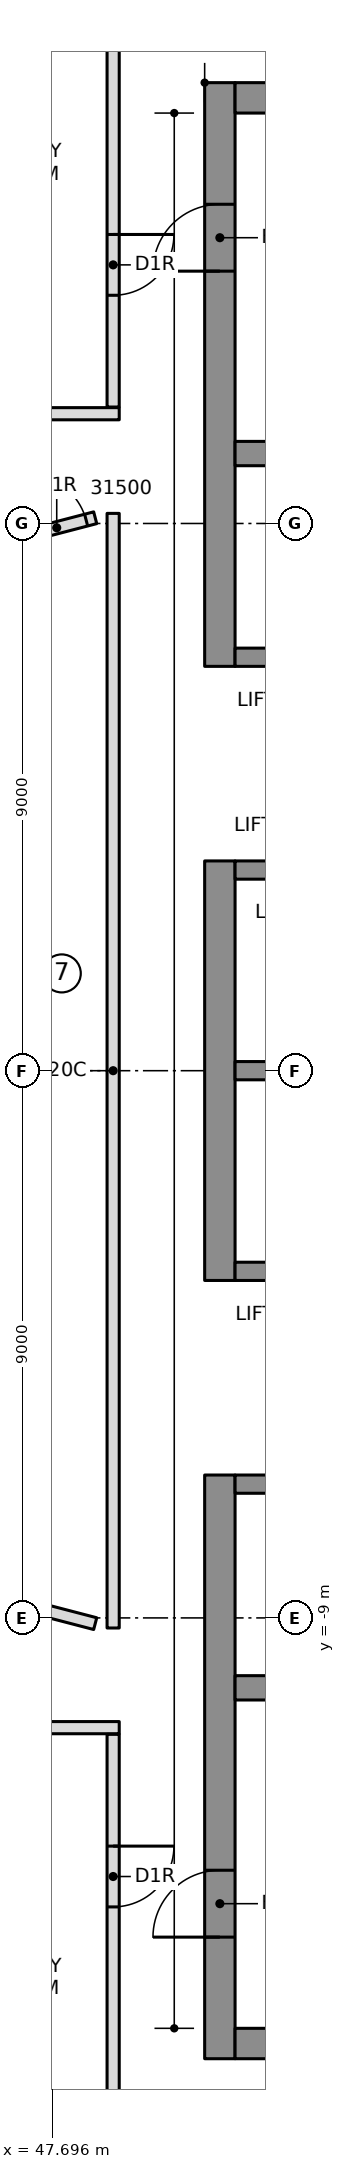
"""IFC4 building model, lengths in metres.
Left out: names, types, materials, properties, quantities, classifications, styles, units other than length and angle.
Written with IfcOpenShell. Run it as: python <this file> out.ifc"""

import sys

from ifc_helpers import new_model, si_unit, direction, frame, frame_2d, origin, place, context, subcontext, project, spatial, rectangle, extrude, element, fill, save


model = new_model("IFC4")
c1 = context("Model", 3, precision=1e-05, world=origin(), true_north=direction((0.0, 1.0)))
c2 = subcontext(c1, "Body", "Model", "MODEL_VIEW")
j1 = project(units=[si_unit("LENGTHUNIT", "METRE"), si_unit("PLANEANGLEUNIT", "RADIAN")], contexts=[c1])
p1 = place(None, origin())
s1 = spatial("IfcSite", under=j1, at=p1, CompositionType="ELEMENT")
p2 = place(p1, origin())
s2 = spatial("IfcBuilding", under=s1, at=p2, CompositionType="ELEMENT")
p3 = place(p2, frame((0.0, 0.0, 308.6)))
s3 = spatial("IfcBuildingStorey", under=s2, at=p3, CompositionType="ELEMENT", Elevation=308.6)
p4 = place(p3, frame((50.45, 6.65, 0.0), z_axis=(0.0, 0.0, 1.0), x_axis=(0.0, 1.0, 0.0)))
e1 = element("IfcWall", 1, at=p4, inside=s3, PredefinedType="SHEAR", context=c2, shape_type="SweptSolid", body=[
    extrude(rectangle(XDim=9.6, YDim=0.5, at=frame_2d((4.8, 0.0))), origin(), (0.0, 0.0, 1.0), 4.6),
])
p5 = place(p4, frame((6.5, 0.0, 0.0)))
e2 = element("IfcOpeningElement", 2, at=p5, cuts=e1, PredefinedType="OPENING", context=c2, shape_type="SweptSolid", body=[
    extrude(rectangle(XDim=1.1, YDim=2.1, at=frame_2d((0.55, 1.05))), frame((0.0, 0.26, 0.0), z_axis=(0.0, -1.0, 0.0), x_axis=(1.0, 0.0, 0.0)), (0.0, 0.0, 1.0), 0.52),
])
p6 = place(p3, frame((50.45, -3.45, 0.0), z_axis=(0.0, 0.0, 1.0), x_axis=(0.0, 1.0, 0.0)))
e3 = element("IfcWall", 3, at=p6, inside=s3, PredefinedType="SHEAR", context=c2, shape_type="SweptSolid", body=[
    extrude(rectangle(XDim=6.9, YDim=0.5, at=frame_2d((3.45, 0.0))), origin(), (0.0, 0.0, 1.0), 4.6),
])
p7 = place(p3, frame((50.45, -16.25, 0.0), z_axis=(0.0, 0.0, 1.0), x_axis=(0.0, 1.0, 0.0)))
e4 = element("IfcWall", 4, at=p7, inside=s3, PredefinedType="SHEAR", context=c2, shape_type="SweptSolid", body=[
    extrude(rectangle(XDim=9.6, YDim=0.5, at=frame_2d((4.8, 0.0))), origin(), (0.0, 0.0, 1.0), 4.6),
])
p8 = place(p7, frame((2.0, 0.0, 0.0)))
e5 = element("IfcOpeningElement", 5, at=p8, cuts=e4, PredefinedType="OPENING", context=c2, shape_type="SweptSolid", body=[
    extrude(rectangle(XDim=1.1, YDim=2.1, at=frame_2d((0.55, 1.05))), frame((0.0, 0.26, 0.0), z_axis=(0.0, -1.0, 0.0), x_axis=(1.0, 0.0, 0.0)), (0.0, 0.0, 1.0), 0.52),
])
for number, where, z_axis, x_axis in (
    (6, (50.7, 16.0, 0.0), (0.0, 0.0, 1.0), (1.0, 0.0, 0.0)),
    (7, (50.7, -16.0, 0.0), (0.0, 0.0, 1.0), (1.0, 0.0, 0.0)),
):
    element("IfcWall", number, at=place(p3, frame(where, z_axis=z_axis, x_axis=x_axis)), inside=s3, PredefinedType="SHEAR", context=c2, shape_type="SweptSolid", body=[
        extrude(rectangle(XDim=13.52, YDim=0.5, at=frame_2d((6.76, 0.0))), origin(), (0.0, 0.0, 1.0), 4.6),
    ])
p9 = place(p3, frame((50.7, 10.15, 0.0), z_axis=(0.0, 0.0, 1.0), x_axis=(1.0, 0.0, 0.0)))
e8 = element("IfcWall", 8, at=p9, inside=s3, PredefinedType="SHEAR", context=c2, shape_type="SweptSolid", body=[
    extrude(rectangle(XDim=13.02, YDim=0.4, at=frame_2d((6.51, 0.0))), origin(), (0.0, 0.0, 1.0), 4.6),
])
p10 = place(p9, frame((0.7, 0.0, 0.0)))
e9 = element("IfcOpeningElement", 9, at=p10, cuts=e8, PredefinedType="OPENING", context=c2, shape_type="SweptSolid", body=[
    extrude(rectangle(XDim=1.1, YDim=2.1, at=frame_2d((0.55, 1.05))), frame((0.0, 0.21, 0.0), z_axis=(0.0, -1.0, 0.0), x_axis=(1.0, 0.0, 0.0)), (0.0, 0.0, 1.0), 0.42),
])
p11 = place(p9, frame((3.5, 0.0, 0.0)))
e10 = element("IfcOpeningElement", 10, at=p11, cuts=e8, PredefinedType="OPENING", context=c2, shape_type="SweptSolid", body=[
    extrude(rectangle(XDim=1.1, YDim=2.1, at=frame_2d((0.55, 1.05))), frame((0.0, 0.21, 0.0), z_axis=(0.0, -1.0, 0.0), x_axis=(1.0, 0.0, 0.0)), (0.0, 0.0, 1.0), 0.42),
])
p12 = place(p3, frame((50.7, -10.15, 0.0), z_axis=(0.0, 0.0, 1.0), x_axis=(1.0, 0.0, 0.0)))
e11 = element("IfcWall", 11, at=p12, inside=s3, PredefinedType="SHEAR", context=c2, shape_type="SweptSolid", body=[
    extrude(rectangle(XDim=13.02, YDim=0.4, at=frame_2d((6.51, 0.0))), origin(), (0.0, 0.0, 1.0), 4.6),
])
p13 = place(p3, frame((50.7, 0.0, 0.0), z_axis=(0.0, 0.0, 1.0), x_axis=(1.0, 0.0, 0.0)))
e12 = element("IfcWall", 12, at=p13, inside=s3, PredefinedType="SHEAR", context=c2, shape_type="SweptSolid", body=[
    extrude(rectangle(XDim=10.9, YDim=0.3, at=frame_2d((5.45, 0.0))), origin(), (0.0, 0.0, 1.0), 4.6),
])
p14 = place(p3, frame((50.7, 3.3, 0.0), z_axis=(0.0, 0.0, 1.0), x_axis=(1.0, 0.0, 0.0)))
e13 = element("IfcWall", 13, at=p14, inside=s3, PredefinedType="SHEAR", context=c2, shape_type="SweptSolid", body=[
    extrude(rectangle(XDim=10.9, YDim=0.3, at=frame_2d((5.45, 0.0))), origin(), (0.0, 0.0, 1.0), 4.6),
])
p15 = place(p14, frame((0.7, 0.0, 0.0)))
e14 = element("IfcOpeningElement", 14, at=p15, cuts=e13, PredefinedType="OPENING", context=c2, shape_type="SweptSolid", body=[
    extrude(rectangle(XDim=1.1, YDim=2.1, at=frame_2d((0.55, 1.05))), frame((0.0, 0.16, 0.0), z_axis=(0.0, -1.0, 0.0), x_axis=(1.0, 0.0, 0.0)), (0.0, 0.0, 1.0), 0.32),
])
p16 = place(p14, frame((3.5, 0.0, 0.0)))
e15 = element("IfcOpeningElement", 15, at=p16, cuts=e13, PredefinedType="OPENING", context=c2, shape_type="SweptSolid", body=[
    extrude(rectangle(XDim=1.1, YDim=2.1, at=frame_2d((0.55, 1.05))), frame((0.0, 0.16, 0.0), z_axis=(0.0, -1.0, 0.0), x_axis=(1.0, 0.0, 0.0)), (0.0, 0.0, 1.0), 0.32),
])
p17 = place(p14, frame((6.4, 0.0, 0.0)))
e16 = element("IfcOpeningElement", 16, at=p17, cuts=e13, PredefinedType="OPENING", context=c2, shape_type="SweptSolid", body=[
    extrude(rectangle(XDim=0.9, YDim=2.1, at=frame_2d((0.45, 1.05))), frame((0.0, 0.16, 0.0), z_axis=(0.0, -1.0, 0.0), x_axis=(1.0, 0.0, 0.0)), (0.0, 0.0, 1.0), 0.32),
])
p18 = place(p14, frame((9.2, 0.0, 0.0)))
e17 = element("IfcOpeningElement", 17, at=p18, cuts=e13, PredefinedType="OPENING", context=c2, shape_type="SweptSolid", body=[
    extrude(rectangle(XDim=0.9, YDim=2.1, at=frame_2d((0.45, 1.05))), frame((0.0, 0.16, 0.0), z_axis=(0.0, -1.0, 0.0), x_axis=(1.0, 0.0, 0.0)), (0.0, 0.0, 1.0), 0.32),
])
p19 = place(p3, frame((50.7, 6.8, 0.0), z_axis=(0.0, 0.0, 1.0), x_axis=(1.0, 0.0, 0.0)))
e18 = element("IfcWall", 18, at=p19, inside=s3, PredefinedType="SHEAR", context=c2, shape_type="SweptSolid", body=[
    extrude(rectangle(XDim=10.9, YDim=0.3, at=frame_2d((5.45, 0.0))), origin(), (0.0, 0.0, 1.0), 4.6),
])
p20 = place(p19, frame((6.4, 0.0, 0.0)))
e19 = element("IfcOpeningElement", 19, at=p20, cuts=e18, PredefinedType="OPENING", context=c2, shape_type="SweptSolid", body=[
    extrude(rectangle(XDim=0.9, YDim=2.1, at=frame_2d((0.45, 1.05))), frame((0.0, 0.16, 0.0), z_axis=(0.0, -1.0, 0.0), x_axis=(1.0, 0.0, 0.0)), (0.0, 0.0, 1.0), 0.32),
])
p21 = place(p19, frame((9.2, 0.0, 0.0)))
e20 = element("IfcOpeningElement", 20, at=p21, cuts=e18, PredefinedType="OPENING", context=c2, shape_type="SweptSolid", body=[
    extrude(rectangle(XDim=0.9, YDim=2.1, at=frame_2d((0.45, 1.05))), frame((0.0, 0.16, 0.0), z_axis=(0.0, -1.0, 0.0), x_axis=(1.0, 0.0, 0.0)), (0.0, 0.0, 1.0), 0.32),
])
p22 = place(p3, frame((50.7, -3.3, 0.0), z_axis=(0.0, 0.0, 1.0), x_axis=(1.0, 0.0, 0.0)))
e21 = element("IfcWall", 21, at=p22, inside=s3, PredefinedType="SHEAR", context=c2, shape_type="SweptSolid", body=[
    extrude(rectangle(XDim=10.9, YDim=0.3, at=frame_2d((5.45, 0.0))), origin(), (0.0, 0.0, 1.0), 4.6),
])
p23 = place(p22, frame((0.7, 0.0, 0.0)))
e22 = element("IfcOpeningElement", 22, at=p23, cuts=e21, PredefinedType="OPENING", context=c2, shape_type="SweptSolid", body=[
    extrude(rectangle(XDim=1.1, YDim=2.1, at=frame_2d((0.55, 1.05))), frame((0.0, 0.16, 0.0), z_axis=(0.0, -1.0, 0.0), x_axis=(1.0, 0.0, 0.0)), (0.0, 0.0, 1.0), 0.32),
])
p24 = place(p22, frame((3.5, 0.0, 0.0)))
e23 = element("IfcOpeningElement", 23, at=p24, cuts=e21, PredefinedType="OPENING", context=c2, shape_type="SweptSolid", body=[
    extrude(rectangle(XDim=1.1, YDim=2.1, at=frame_2d((0.55, 1.05))), frame((0.0, 0.16, 0.0), z_axis=(0.0, -1.0, 0.0), x_axis=(1.0, 0.0, 0.0)), (0.0, 0.0, 1.0), 0.32),
])
p25 = place(p22, frame((6.3, 0.0, 0.0)))
e24 = element("IfcOpeningElement", 24, at=p25, cuts=e21, PredefinedType="OPENING", context=c2, shape_type="SweptSolid", body=[
    extrude(rectangle(XDim=1.1, YDim=2.1, at=frame_2d((0.55, 1.05))), frame((0.0, 0.16, 0.0), z_axis=(0.0, -1.0, 0.0), x_axis=(1.0, 0.0, 0.0)), (0.0, 0.0, 1.0), 0.32),
])
p26 = place(p22, frame((9.1, 0.0, 0.0)))
e25 = element("IfcOpeningElement", 25, at=p26, cuts=e21, PredefinedType="OPENING", context=c2, shape_type="SweptSolid", body=[
    extrude(rectangle(XDim=1.1, YDim=2.1, at=frame_2d((0.55, 1.05))), frame((0.0, 0.16, 0.0), z_axis=(0.0, -1.0, 0.0), x_axis=(1.0, 0.0, 0.0)), (0.0, 0.0, 1.0), 0.32),
])
p27 = place(p3, frame((50.7, -6.8, 0.0), z_axis=(0.0, 0.0, 1.0), x_axis=(1.0, 0.0, 0.0)))
e26 = element("IfcWall", 26, at=p27, inside=s3, PredefinedType="SHEAR", context=c2, shape_type="SweptSolid", body=[
    extrude(rectangle(XDim=10.9, YDim=0.3, at=frame_2d((5.45, 0.0))), origin(), (0.0, 0.0, 1.0), 4.6),
])
p28 = place(p27, frame((6.3, 0.0, 0.0)))
e27 = element("IfcOpeningElement", 27, at=p28, cuts=e26, PredefinedType="OPENING", context=c2, shape_type="SweptSolid", body=[
    extrude(rectangle(XDim=1.1, YDim=2.1, at=frame_2d((0.55, 1.05))), frame((0.0, 0.16, 0.0), z_axis=(0.0, -1.0, 0.0), x_axis=(1.0, 0.0, 0.0)), (0.0, 0.0, 1.0), 0.32),
])
p29 = place(p27, frame((9.1, 0.0, 0.0)))
e28 = element("IfcOpeningElement", 28, at=p29, cuts=e26, PredefinedType="OPENING", context=c2, shape_type="SweptSolid", body=[
    extrude(rectangle(XDim=1.1, YDim=2.1, at=frame_2d((0.55, 1.05))), frame((0.0, 0.16, 0.0), z_axis=(0.0, -1.0, 0.0), x_axis=(1.0, 0.0, 0.0)), (0.0, 0.0, 1.0), 0.32),
])
p30 = place(p27, frame((0.8, 0.0, 0.0)))
e29 = element("IfcOpeningElement", 29, at=p30, cuts=e26, PredefinedType="OPENING", context=c2, shape_type="SweptSolid", body=[
    extrude(rectangle(XDim=0.9, YDim=2.1, at=frame_2d((0.45, 1.05))), frame((0.0, 0.16, 0.0), z_axis=(0.0, -1.0, 0.0), x_axis=(1.0, 0.0, 0.0)), (0.0, 0.0, 1.0), 0.32),
])
p31 = place(p27, frame((3.6, 0.0, 0.0)))
e30 = element("IfcOpeningElement", 30, at=p31, cuts=e26, PredefinedType="OPENING", context=c2, shape_type="SweptSolid", body=[
    extrude(rectangle(XDim=0.9, YDim=2.1, at=frame_2d((0.45, 1.05))), frame((0.0, 0.16, 0.0), z_axis=(0.0, -1.0, 0.0), x_axis=(1.0, 0.0, 0.0)), (0.0, 0.0, 1.0), 0.32),
])
p32 = place(p3, frame((48.795, 10.805, 0.0), z_axis=(0.0, 0.0, 1.0), x_axis=(-0.999999999048, -4.3628114e-05, 0.0)))
e31 = element("IfcWall", 31, at=p32, inside=s3, PredefinedType="PARTITIONING", context=c2, shape_type="SweptSolid", body=[
    extrude(rectangle(XDim=5.596, YDim=0.2, at=frame_2d((2.798, 0.0))), origin(), (0.0, 0.0, 1.0), 4.3),
])
p33 = place(p32, frame((3.295, 0.0, 0.0)))
e32 = element("IfcOpeningElement", 32, at=p33, cuts=e31, PredefinedType="OPENING", context=c2, shape_type="SweptSolid", body=[
    extrude(rectangle(XDim=1.0, YDim=2.1, at=frame_2d((0.5, 1.05))), frame((0.0, 0.11, 0.0), z_axis=(0.0, -1.0, 0.0), x_axis=(1.0, 0.0, 0.0)), (0.0, 0.0, 1.0), 0.22),
])
p34 = place(p3, frame((43.199, -10.805, 0.0), z_axis=(0.0, 0.0, 1.0), x_axis=(0.999999999048, -4.3628114e-05, 0.0)))
e33 = element("IfcWall", 33, at=p34, inside=s3, PredefinedType="PARTITIONING", context=c2, shape_type="SweptSolid", body=[
    extrude(rectangle(XDim=5.596, YDim=0.2, at=frame_2d((2.798, 0.0))), origin(), (0.0, 0.0, 1.0), 4.3),
])
p35 = place(p34, frame((1.301, 0.0, 0.0)))
e34 = element("IfcOpeningElement", 34, at=p35, cuts=e33, PredefinedType="OPENING", context=c2, shape_type="SweptSolid", body=[
    extrude(rectangle(XDim=1.0, YDim=2.1, at=frame_2d((0.5, 1.05))), frame((0.0, 0.11, 0.0), z_axis=(0.0, -1.0, 0.0), x_axis=(1.0, 0.0, 0.0)), (0.0, 0.0, 1.0), 0.22),
])
p36 = place(p3, frame((47.134, 8.764, 0.0), z_axis=(0.0, 0.0, 1.0), x_axis=(0.967678694968, 0.252186326563, 0.0)))
e35 = element("IfcWall", 35, at=p36, inside=s3, PredefinedType="PARTITIONING", context=c2, shape_type="SweptSolid", body=[
    extrude(rectangle(XDim=1.308, YDim=0.2, at=frame_2d((0.654, 0.0))), origin(), (0.0, 0.0, 1.0), 4.3),
])
p37 = place(p36, frame((0.154, 0.0, 0.0)))
e36 = element("IfcOpeningElement", 36, at=p37, cuts=e35, PredefinedType="OPENING", context=c2, shape_type="SweptSolid", body=[
    extrude(rectangle(XDim=1.0, YDim=2.1, at=frame_2d((0.5, 1.05))), frame((0.0, 0.11, 0.0), z_axis=(0.0, -1.0, 0.0), x_axis=(1.0, 0.0, 0.0)), (0.0, 0.0, 1.0), 0.22),
])
p38 = place(p3, frame((48.4, -9.094, 0.0), z_axis=(0.0, 0.0, 1.0), x_axis=(-0.967678694968, 0.252186326563, 0.0)))
e37 = element("IfcWall", 37, at=p38, inside=s3, PredefinedType="PARTITIONING", context=c2, shape_type="SweptSolid", body=[
    extrude(rectangle(XDim=1.308, YDim=0.2, at=frame_2d((0.654, 0.0))), origin(), (0.0, 0.0, 1.0), 4.3),
])
p39 = place(p3, frame((48.695, 18.589, 0.0), z_axis=(0.0, 0.0, 1.0), x_axis=(0.0, -1.0, 0.0)))
e38 = element("IfcWall", 38, at=p39, inside=s3, PredefinedType="PARTITIONING", context=c2, shape_type="SweptSolid", body=[
    extrude(rectangle(XDim=7.674, YDim=0.2, at=frame_2d((3.837, 0.0))), origin(), (0.0, 0.0, 1.0), 4.3),
])
p40 = place(p39, frame((4.836, 0.0, 0.0)))
e39 = element("IfcOpeningElement", 39, at=p40, cuts=e38, PredefinedType="OPENING", context=c2, shape_type="SweptSolid", body=[
    extrude(rectangle(XDim=1.0, YDim=2.1, at=frame_2d((0.5, 1.05))), frame((0.0, 0.11, 0.0), z_axis=(0.0, -1.0, 0.0), x_axis=(1.0, 0.0, 0.0)), (0.0, 0.0, 1.0), 0.22),
])
p41 = place(p3, frame((48.695, -10.915, 0.0), z_axis=(0.0, 0.0, 1.0), x_axis=(0.0, -1.0, 0.0)))
e40 = element("IfcWall", 40, at=p41, inside=s3, PredefinedType="PARTITIONING", context=c2, shape_type="SweptSolid", body=[
    extrude(rectangle(XDim=7.674, YDim=0.2, at=frame_2d((3.837, 0.0))), origin(), (0.0, 0.0, 1.0), 4.3),
])
p42 = place(p41, frame((1.838, 0.0, 0.0)))
e41 = element("IfcOpeningElement", 41, at=p42, cuts=e40, PredefinedType="OPENING", context=c2, shape_type="SweptSolid", body=[
    extrude(rectangle(XDim=1.0, YDim=2.1, at=frame_2d((0.5, 1.05))), frame((0.0, 0.11, 0.0), z_axis=(0.0, -1.0, 0.0), x_axis=(1.0, 0.0, 0.0)), (0.0, 0.0, 1.0), 0.22),
])
p43 = place(p3, frame((48.695, 9.166, 0.0), z_axis=(0.0, 0.0, 1.0), x_axis=(0.0, -1.0, 0.0)))
e42 = element("IfcWall", 42, at=p43, inside=s3, PredefinedType="PARTITIONING", context=c2, shape_type="SweptSolid", body=[
    extrude(rectangle(XDim=18.332, YDim=0.2, at=frame_2d((9.166, 0.0))), origin(), (0.0, 0.0, 1.0), 4.3),
])
p44 = place(p37, origin())
e43 = element("IfcDoor", 43, at=p44, inside=s3, OperationType="SINGLE_SWING_RIGHT", PredefinedType="DOOR", context=c2, shape_type="SweptSolid", body=[
    extrude(rectangle(XDim=1.0, YDim=2.1, at=frame_2d((0.5, 1.05))), frame((0.0, 0.025, 0.0), z_axis=(0.0, -1.0, 0.0), x_axis=(1.0, 0.0, 0.0)), (0.0, 0.0, 1.0), 0.05),
])
fill(e36, e43)
p45 = place(p40, origin())
e44 = element("IfcDoor", 44, at=p45, inside=s3, OperationType="SINGLE_SWING_RIGHT", PredefinedType="DOOR", context=c2, shape_type="SweptSolid", body=[
    extrude(rectangle(XDim=1.0, YDim=2.1, at=frame_2d((0.5, 1.05))), frame((0.0, 0.025, 0.0), z_axis=(0.0, -1.0, 0.0), x_axis=(1.0, 0.0, 0.0)), (0.0, 0.0, 1.0), 0.05),
])
fill(e39, e44)
p46 = place(p42, origin())
e45 = element("IfcDoor", 45, at=p46, inside=s3, OperationType="SINGLE_SWING_RIGHT", PredefinedType="DOOR", context=c2, shape_type="SweptSolid", body=[
    extrude(rectangle(XDim=1.0, YDim=2.1, at=frame_2d((0.5, 1.05))), frame((0.0, 0.025, 0.0), z_axis=(0.0, -1.0, 0.0), x_axis=(1.0, 0.0, 0.0)), (0.0, 0.0, 1.0), 0.05),
])
fill(e41, e45)
p47 = place(p5, origin())
e46 = element("IfcDoor", 46, at=p47, inside=s3, OperationType="SINGLE_SWING_RIGHT", PredefinedType="DOOR", context=c2, shape_type="SweptSolid", body=[
    extrude(rectangle(XDim=1.1, YDim=2.1, at=frame_2d((0.55, 1.05))), frame((0.0, 0.025, 0.0), z_axis=(0.0, -1.0, 0.0), x_axis=(1.0, 0.0, 0.0)), (0.0, 0.0, 1.0), 0.05),
])
fill(e2, e46)
p48 = place(p8, origin())
e47 = element("IfcDoor", 47, at=p48, inside=s3, OperationType="SINGLE_SWING_RIGHT", PredefinedType="DOOR", context=c2, shape_type="SweptSolid", body=[
    extrude(rectangle(XDim=1.1, YDim=2.1, at=frame_2d((0.55, 1.05))), frame((0.0, 0.025, 0.0), z_axis=(0.0, -1.0, 0.0), x_axis=(1.0, 0.0, 0.0)), (0.0, 0.0, 1.0), 0.05),
])
fill(e5, e47)
save(model, sys.argv[1])
